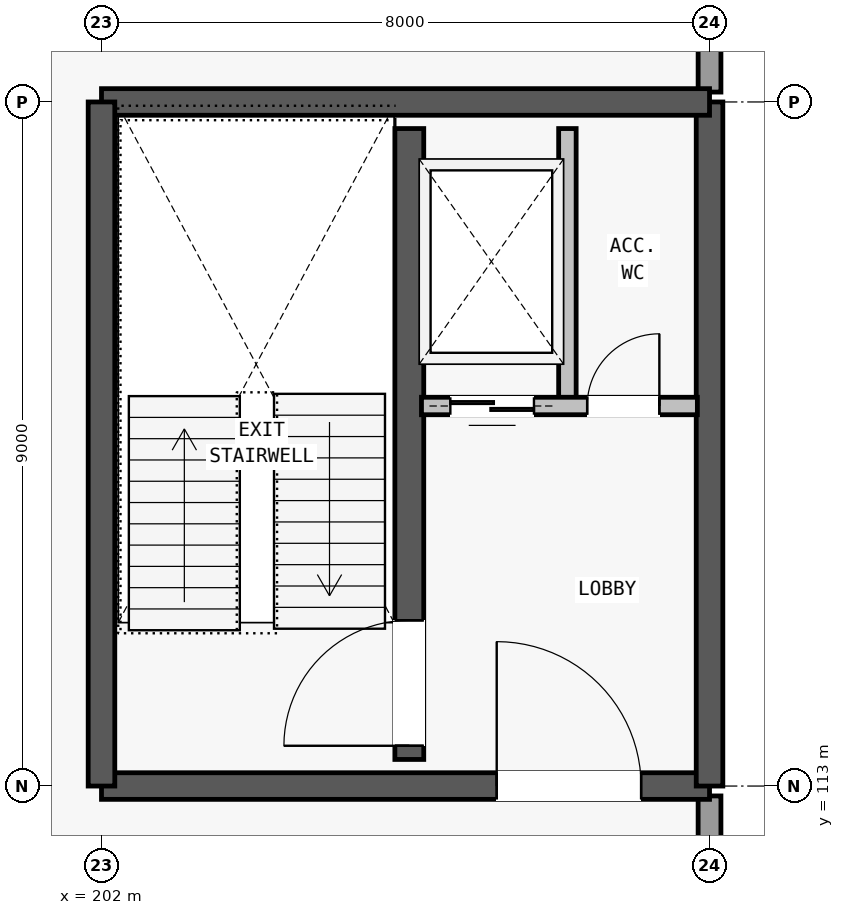
"""IFC4 building model, lengths in metres.
Left out: names, types, materials, properties, quantities, classifications, styles, units other than length and angle.
Written with IfcOpenShell. Run it as: python <this file> out.ifc"""

import sys

from ifc_helpers import new_model, si_unit, direction, frame, frame_2d, origin, place, context, subcontext, project, spatial, rectangle, extrude, element, fill, save


model = new_model("IFC4")
c1 = context("Model", 3, precision=1e-05, world=origin(), true_north=direction((0.0, 1.0)))
c2 = subcontext(c1, "Body", "Model", "MODEL_VIEW")
j1 = project(units=[si_unit("LENGTHUNIT", "METRE"), si_unit("PLANEANGLEUNIT", "RADIAN")], contexts=[c1])
p1 = place(None, origin())
s1 = spatial("IfcSite", under=j1, at=p1, CompositionType="ELEMENT")
p2 = place(p1, origin())
s2 = spatial("IfcBuilding", under=s1, at=p2, CompositionType="ELEMENT")
p3 = place(p2, frame((0.0, 0.0, 13.4)))
s3 = spatial("IfcBuildingStorey", under=s2, at=p3, CompositionType="ELEMENT", Elevation=13.4)
for number, where, z_axis, x_axis in (
    (1, (210.0, 104.235, 0.0), (0.0, 0.0, 1.0), (0.0, 1.0, 0.0)),
    (2, (210.0, 122.13, 0.0), (0.0, 0.0, 1.0), (0.0, 1.0, 0.0)),
):
    element("IfcWall", number, at=place(p3, frame(where, z_axis=z_axis, x_axis=x_axis)), inside=s3, PredefinedType="STANDARD", context=c2, shape_type="SweptSolid", body=[
        extrude(rectangle(XDim=8.635, YDim=0.3, at=frame_2d((4.317, 0.0))), origin(), (0.0, 0.0, 1.0), 2.48),
    ])
p4 = place(p3, frame((202.0, 113.0, 0.0), z_axis=(0.0, 0.0, 1.0), x_axis=(1.0, 0.0, 0.0)))
e3 = element("IfcWall", 3, at=p4, inside=s3, PredefinedType="SHEAR", context=c2, shape_type="SweptSolid", body=[
    extrude(rectangle(XDim=8.0, YDim=0.35, at=frame_2d((4.0, 0.0))), origin(), (0.0, 0.0, 1.0), 3.62),
])
p5 = place(p4, frame((5.2, 0.0, 0.0)))
e4 = element("IfcOpeningElement", 4, at=p5, cuts=e3, PredefinedType="OPENING", context=c2, shape_type="SweptSolid", body=[
    extrude(rectangle(XDim=1.9, YDim=2.3, at=frame_2d((0.95, 1.15))), frame((0.0, 0.185, 0.0), z_axis=(0.0, -1.0, 0.0), x_axis=(1.0, 0.0, 0.0)), (0.0, 0.0, 1.0), 0.37),
])
p6 = place(p3, frame((210.0, 113.0, 0.0), z_axis=(0.0, 0.0, 1.0), x_axis=(0.0, 1.0, 0.0)))
e5 = element("IfcWall", 5, at=p6, inside=s3, PredefinedType="SHEAR", context=c2, shape_type="SweptSolid", body=[
    extrude(rectangle(XDim=9.0, YDim=0.35, at=frame_2d((4.5, 0.0))), origin(), (0.0, 0.0, 1.0), 3.62),
])
p7 = place(p3, frame((210.0, 122.0, 0.0), z_axis=(0.0, 0.0, 1.0), x_axis=(-1.0, 0.0, 0.0)))
e6 = element("IfcWall", 6, at=p7, inside=s3, PredefinedType="SHEAR", context=c2, shape_type="SweptSolid", body=[
    extrude(rectangle(XDim=8.0, YDim=0.35, at=frame_2d((4.0, 0.0))), origin(), (0.0, 0.0, 1.0), 3.62),
])
p8 = place(p3, frame((202.0, 122.0, 0.0), z_axis=(0.0, 0.0, 1.0), x_axis=(0.0, -1.0, 0.0)))
e7 = element("IfcWall", 7, at=p8, inside=s3, PredefinedType="SHEAR", context=c2, shape_type="SweptSolid", body=[
    extrude(rectangle(XDim=9.0, YDim=0.35, at=frame_2d((4.5, 0.0))), origin(), (0.0, 0.0, 1.0), 3.62),
])
p9 = place(p3, frame((206.05, 113.35, 0.0), z_axis=(0.0, 0.0, 1.0), x_axis=(0.0, 1.0, 0.0)))
e8 = element("IfcWall", 8, at=p9, inside=s3, PredefinedType="SHEAR", context=c2, shape_type="SweptSolid", body=[
    extrude(rectangle(XDim=8.3, YDim=0.38, at=frame_2d((4.15, 0.0))), origin(), (0.0, 0.0, 1.0), 3.62),
])
p10 = place(p9, frame((0.18, 0.0, 0.0)))
e9 = element("IfcOpeningElement", 9, at=p10, cuts=e8, PredefinedType="OPENING", context=c2, shape_type="SweptSolid", body=[
    extrude(rectangle(XDim=1.65, YDim=2.2, at=frame_2d((0.825, 1.1))), frame((0.0, 0.2, 0.0), z_axis=(0.0, -1.0, 0.0), x_axis=(1.0, 0.0, 0.0)), (0.0, 0.0, 1.0), 0.4),
])
p11 = place(p3, frame((208.13, 118.0, 0.0), z_axis=(0.0, 0.0, 1.0), x_axis=(0.0, 1.0, 0.0)))
e10 = element("IfcWall", 10, at=p11, inside=s3, PredefinedType="PARTITIONING", context=c2, shape_type="SweptSolid", body=[
    extrude(rectangle(XDim=3.65, YDim=0.23, at=frame_2d((1.825, 0.0))), origin(), (0.0, 0.0, 1.0), 2.48),
])
p12 = place(p3, frame((206.21, 118.0, 0.0), z_axis=(0.0, 0.0, 1.0), x_axis=(1.0, 0.0, 0.0)))
e11 = element("IfcWall", 11, at=p12, inside=s3, PredefinedType="PARTITIONING", context=c2, shape_type="SweptSolid", body=[
    extrude(rectangle(XDim=3.63, YDim=0.23, at=frame_2d((1.815, 0.0))), origin(), (0.0, 0.0, 1.0), 2.48),
])
p13 = place(p12, frame((0.38, 0.0, 0.0)))
e12 = element("IfcOpeningElement", 12, at=p13, cuts=e11, PredefinedType="OPENING", context=c2, shape_type="SweptSolid", body=[
    extrude(rectangle(XDim=1.1, YDim=2.15, at=frame_2d((0.55, 1.075))), frame((0.0, 0.125, 0.0), z_axis=(0.0, -1.0, 0.0), x_axis=(1.0, 0.0, 0.0)), (0.0, 0.0, 1.0), 0.25),
])
p14 = place(p12, frame((2.18, 0.0, 0.0)))
e13 = element("IfcOpeningElement", 13, at=p14, cuts=e11, PredefinedType="OPENING", context=c2, shape_type="SweptSolid", body=[
    extrude(rectangle(XDim=0.95, YDim=2.1, at=frame_2d((0.475, 1.05))), frame((0.0, 0.125, 0.0), z_axis=(0.0, -1.0, 0.0), x_axis=(1.0, 0.0, 0.0)), (0.0, 0.0, 1.0), 0.25),
])
p15 = place(p5, origin())
e14 = element("IfcDoor", 14, at=p15, inside=s3, OperationType="SINGLE_SWING_LEFT", PredefinedType="DOOR", context=c2, shape_type="SweptSolid", body=[
    extrude(rectangle(XDim=1.9, YDim=2.3, at=frame_2d((0.95, 1.15))), frame((0.0, 0.025, 0.0), z_axis=(0.0, -1.0, 0.0), x_axis=(1.0, 0.0, 0.0)), (0.0, 0.0, 1.0), 0.05),
])
fill(e4, e14)
p16 = place(p10, origin())
e15 = element("IfcDoor", 15, at=p16, inside=s3, OperationType="SINGLE_SWING_LEFT", PredefinedType="DOOR", context=c2, shape_type="SweptSolid", body=[
    extrude(rectangle(XDim=1.65, YDim=2.2, at=frame_2d((0.825, 1.1))), frame((0.0, 0.025, 0.0), z_axis=(0.0, -1.0, 0.0), x_axis=(1.0, 0.0, 0.0)), (0.0, 0.0, 1.0), 0.05),
])
fill(e9, e15)
p17 = place(p13, origin())
e16 = element("IfcDoor", 16, at=p17, inside=s3, OperationType="SLIDING_TO_LEFT", PredefinedType="DOOR", context=c2, shape_type="SweptSolid", body=[
    extrude(rectangle(XDim=1.1, YDim=2.15, at=frame_2d((0.55, 1.075))), frame((0.0, 0.025, 0.0), z_axis=(0.0, -1.0, 0.0), x_axis=(1.0, 0.0, 0.0)), (0.0, 0.0, 1.0), 0.05),
])
fill(e12, e16)
p18 = place(p14, origin())
e17 = element("IfcDoor", 17, at=p18, inside=s3, OperationType="SINGLE_SWING_RIGHT", PredefinedType="DOOR", context=c2, shape_type="SweptSolid", body=[
    extrude(rectangle(XDim=0.95, YDim=2.1, at=frame_2d((0.475, 1.05))), frame((0.0, 0.025, 0.0), z_axis=(0.0, -1.0, 0.0), x_axis=(1.0, 0.0, 0.0)), (0.0, 0.0, 1.0), 0.05),
])
fill(e13, e17)
save(model, sys.argv[1])
